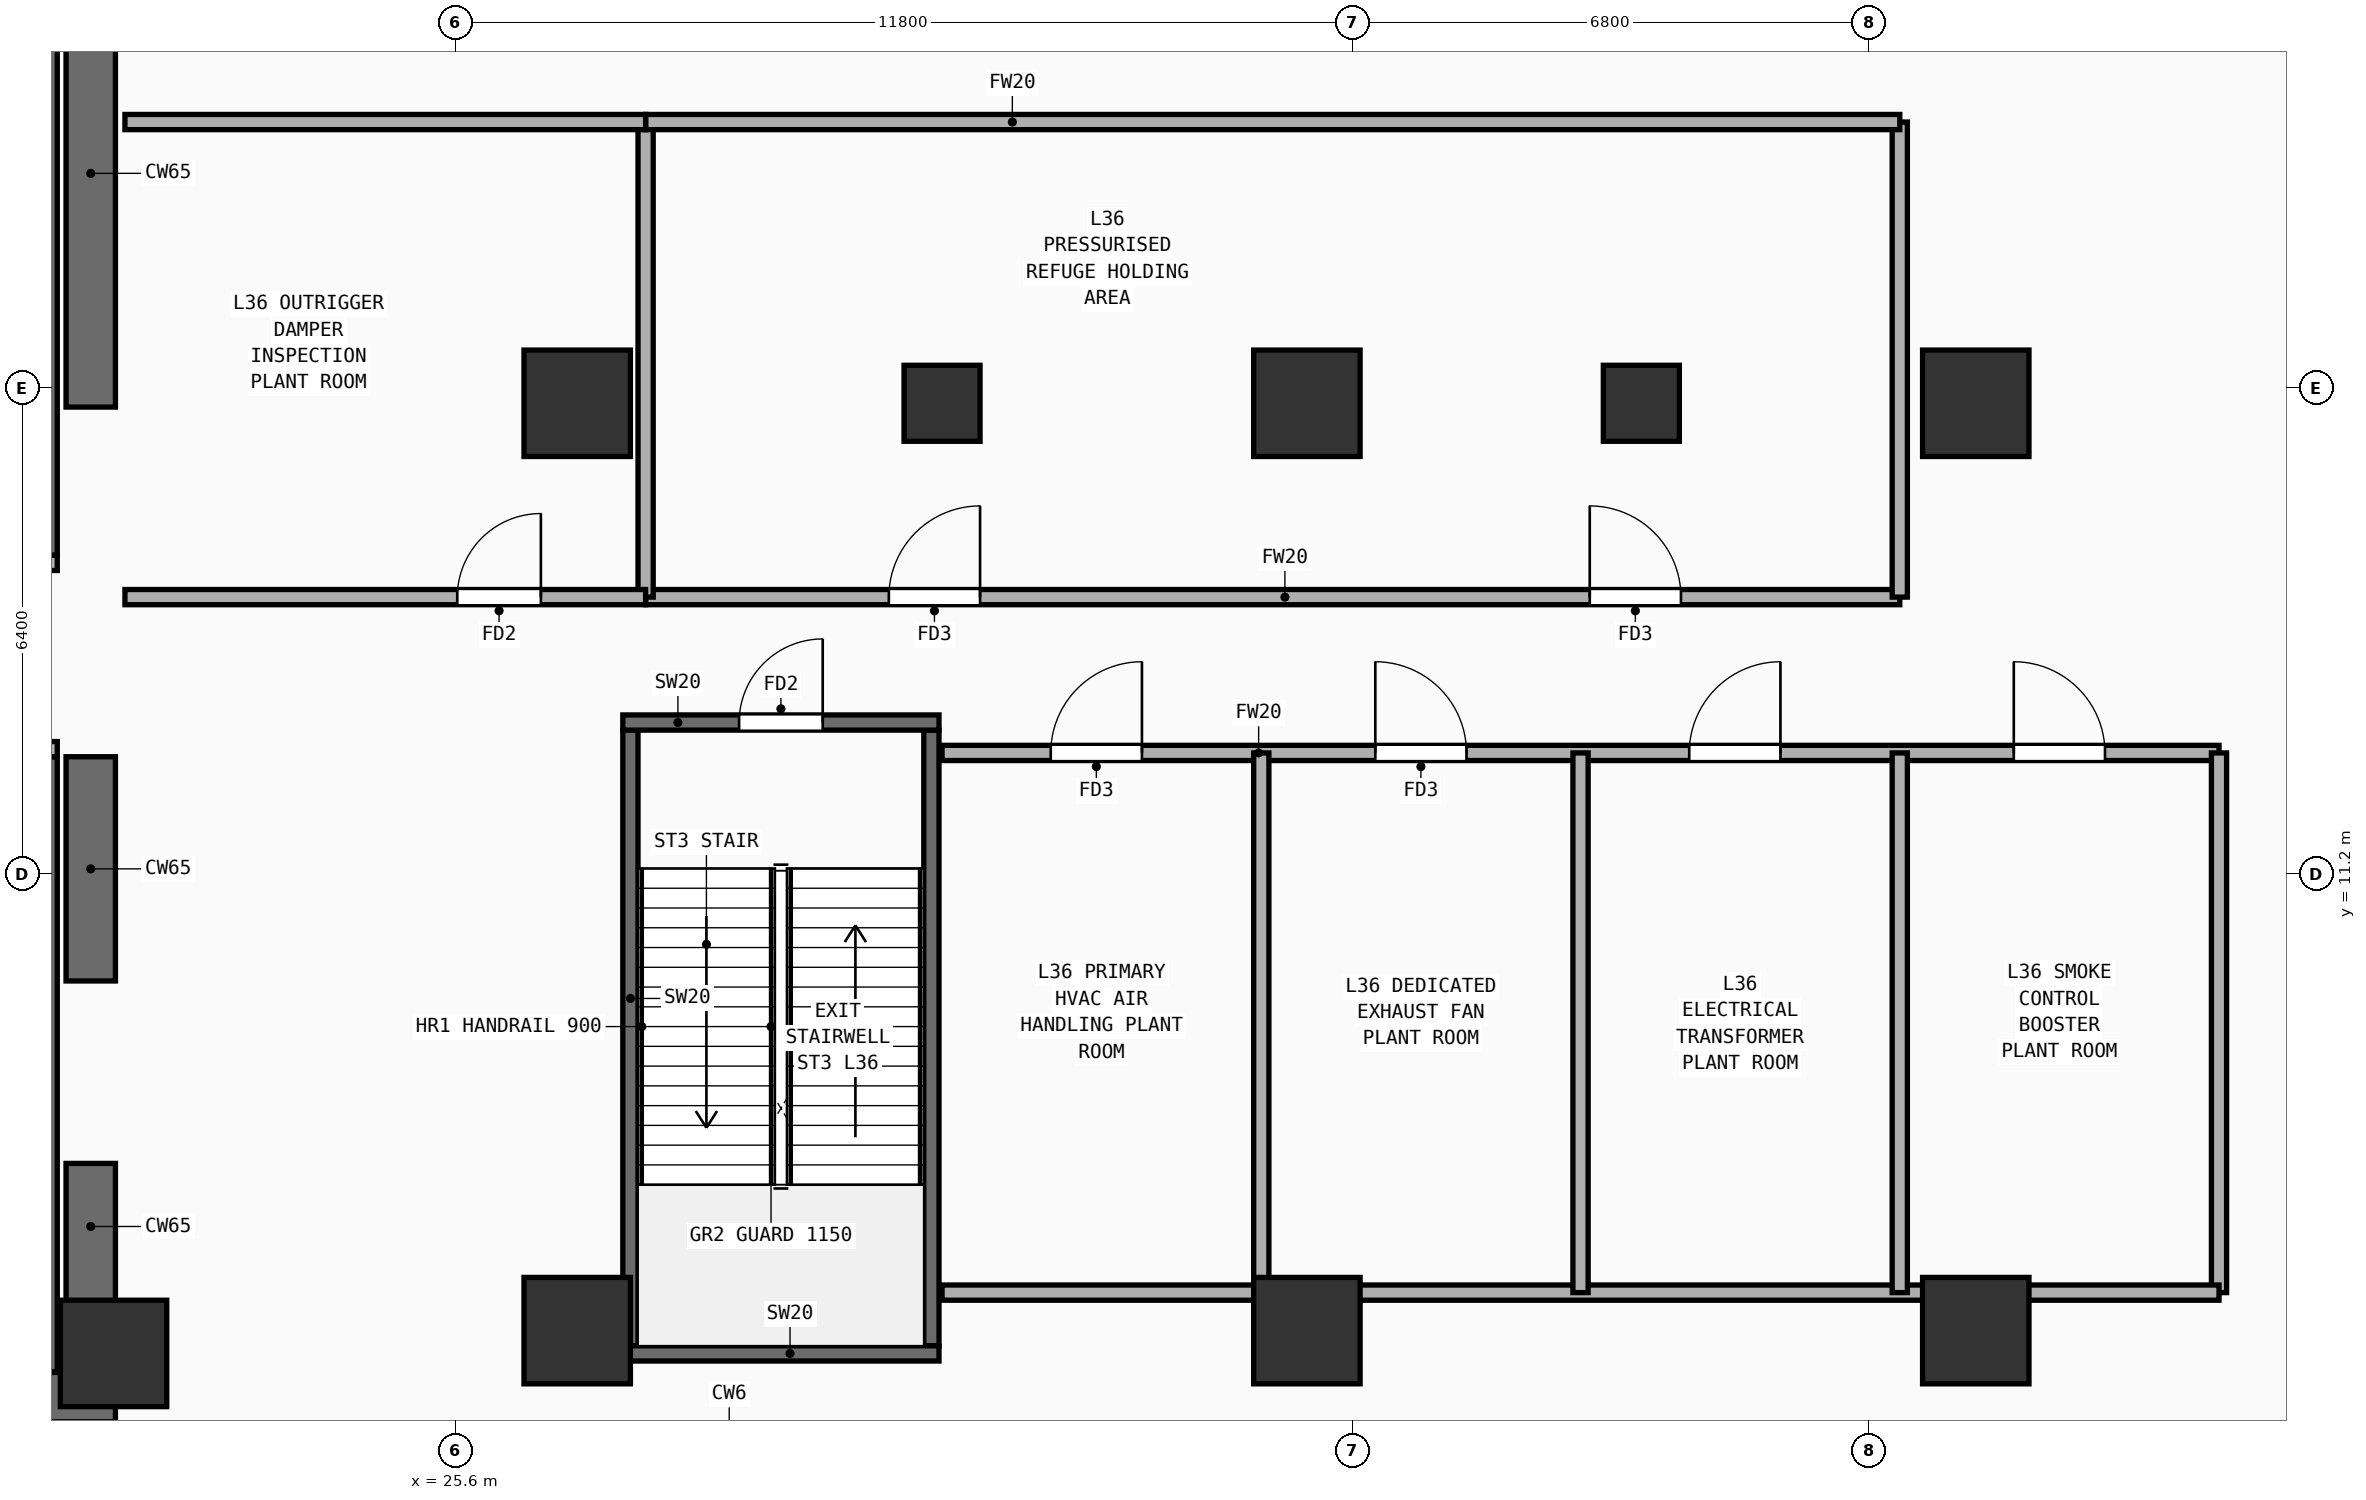
"""IFC4 building model, lengths in metres.
Left out: names, types, materials, properties, quantities, classifications, styles, units other than length and angle.
Written with IfcOpenShell. Run it as: python <this file> out.ifc"""

import sys

from ifc_helpers import new_model, si_unit, direction, frame, frame_2d, origin, origin_2d, place, context, subcontext, project, spatial, rectangle, extrude, element, fill, save


model = new_model("IFC4")
c1 = context("Model", 3, precision=1e-05, world=origin(), true_north=direction((0.0, 1.0)))
c2 = subcontext(c1, "Body", "Model", "MODEL_VIEW")
j1 = project(units=[si_unit("LENGTHUNIT", "METRE"), si_unit("PLANEANGLEUNIT", "RADIAN")], contexts=[c1])
p1 = place(None, origin())
s1 = spatial("IfcSite", under=j1, at=p1, CompositionType="ELEMENT")
p2 = place(p1, origin())
s2 = spatial("IfcBuilding", under=s1, at=p2, CompositionType="ELEMENT")
p3 = place(p2, frame((0.0, 0.0, 141.1)))
s3 = spatial("IfcBuildingStorey", under=s2, at=p3, CompositionType="ELEMENT", Elevation=141.1)
p4 = place(p3, frame((7.125, 4.325, 0.0), z_axis=(0.0, 0.0, 1.0), x_axis=(1.0, 0.0, 0.0)))
e1 = element("IfcWall", 1, at=p4, inside=s3, PredefinedType="SHEAR", context=c2, shape_type="SweptSolid", body=[
    extrude(rectangle(XDim=14.0, YDim=0.65, at=frame_2d((7.0, 0.0))), origin(), (0.0, 0.0, 1.0), 4.86),
])
p5 = place(p3, frame((20.8, 4.65, 0.0), z_axis=(0.0, 0.0, 1.0), x_axis=(0.0, 1.0, 0.0)))
e2 = element("IfcWall", 2, at=p5, inside=s3, PredefinedType="SHEAR", context=c2, shape_type="SweptSolid", body=[
    extrude(rectangle(XDim=2.75, YDim=0.65, at=frame_2d((1.375, 0.0))), origin(), (0.0, 0.0, 1.0), 4.86),
])
p6 = place(p3, frame((20.8, 9.8, 0.0), z_axis=(0.0, 0.0, 1.0), x_axis=(0.0, 1.0, 0.0)))
e3 = element("IfcWall", 3, at=p6, inside=s3, PredefinedType="SHEAR", context=c2, shape_type="SweptSolid", body=[
    extrude(rectangle(XDim=2.95, YDim=0.65, at=frame_2d((1.475, 0.0))), origin(), (0.0, 0.0, 1.0), 4.86),
])
p7 = place(p3, frame((20.8, 17.35, 0.0), z_axis=(0.0, 0.0, 1.0), x_axis=(0.0, 1.0, 0.0)))
e4 = element("IfcWall", 4, at=p7, inside=s3, PredefinedType="SHEAR", context=c2, shape_type="SweptSolid", body=[
    extrude(rectangle(XDim=6.15, YDim=0.65, at=frame_2d((3.075, 0.0))), origin(), (0.0, 0.0, 1.0), 4.86),
])
for number, where, z_axis, x_axis in (
    (5, (21.1, 4.9, 0.0), (0.0, 0.0, 1.0), (1.0, 0.0, 0.0)),
    (6, (27.2, 5.2, 0.0), (0.0, 0.0, 1.0), (1.0, 0.0, 0.0)),
    (7, (36.8, 5.2, 0.0), (0.0, 0.0, 1.0), (1.0, 0.0, 0.0)),
    (8, (45.6, 5.2, 0.0), (0.0, 0.0, 1.0), (1.0, 0.0, 0.0)),
    (9, (27.2, 17.4, 0.0), (0.0, 0.0, 1.0), (1.0, 0.0, 0.0)),
    (10, (36.8, 17.4, 0.0), (0.0, 0.0, 1.0), (1.0, 0.0, 0.0)),
    (11, (45.6, 17.4, 0.0), (0.0, 0.0, 1.0), (1.0, 0.0, 0.0)),
):
    element("IfcColumn", number, at=place(p3, frame(where, z_axis=z_axis, x_axis=x_axis)), inside=s3, PredefinedType="COLUMN", context=c2, shape_type="SweptSolid", body=[
        extrude(rectangle(XDim=1.4, YDim=1.4, at=origin_2d()), origin(), (0.0, 0.0, 1.0), 4.86),
    ])
for number, where, z_axis, x_axis in (
    (12, (32.0, 17.4, 0.0), (0.0, 0.0, 1.0), (1.0, 0.0, 0.0)),
    (13, (41.2, 17.4, 0.0), (0.0, 0.0, 1.0), (1.0, 0.0, 0.0)),
):
    element("IfcColumn", number, at=place(p3, frame(where, z_axis=z_axis, x_axis=x_axis)), inside=s3, PredefinedType="COLUMN", context=c2, shape_type="SweptSolid", body=[
        extrude(rectangle(XDim=1.0, YDim=1.0, at=origin_2d()), origin(), (0.0, 0.0, 1.0), 4.86),
    ])
p8 = place(p3, frame((20.26, 4.66, 0.0), z_axis=(0.0, 0.0, 1.0), x_axis=(0.0, 1.0, 0.0)))
e14 = element("IfcWall", 14, at=p8, inside=s3, PredefinedType="SHEAR", context=c2, shape_type="SweptSolid", body=[
    extrude(rectangle(XDim=8.09, YDim=0.2, at=frame_2d((4.045, 0.0))), origin(), (0.0, 0.0, 1.0), 4.86),
])
p9 = place(p3, frame((16.4, 12.85, 0.0), z_axis=(0.0, 0.0, 1.0), x_axis=(1.0, 0.0, 0.0)))
e15 = element("IfcWall", 15, at=p9, inside=s3, PredefinedType="PARTITIONING", context=c2, shape_type="SweptSolid", body=[
    extrude(rectangle(XDim=3.96, YDim=0.2, at=frame_2d((1.98, 0.0))), origin(), (0.0, 0.0, 1.0), 4.86),
])
p10 = place(p9, frame((1.304, 0.0, 0.0)))
e16 = element("IfcOpeningElement", 16, at=p10, cuts=e15, PredefinedType="OPENING", context=c2, shape_type="SweptSolid", body=[
    extrude(rectangle(XDim=1.1, YDim=2.2, at=frame_2d((0.55, 1.1))), frame((0.0, 0.11, 0.0), z_axis=(0.0, -1.0, 0.0), x_axis=(1.0, 0.0, 0.0)), (0.0, 0.0, 1.0), 0.22),
])
p11 = place(p3, frame((20.26, 15.4, 0.0), z_axis=(0.0, 0.0, 1.0), x_axis=(0.0, 1.0, 0.0)))
e17 = element("IfcWall", 17, at=p11, inside=s3, PredefinedType="SHEAR", context=c2, shape_type="SweptSolid", body=[
    extrude(rectangle(XDim=8.09, YDim=0.2, at=frame_2d((4.045, 0.0))), origin(), (0.0, 0.0, 1.0), 4.86),
])
p12 = place(p3, frame((16.41, 15.3, 0.0), z_axis=(0.0, 0.0, 1.0), x_axis=(1.0, 0.0, 0.0)))
e18 = element("IfcWall", 18, at=p12, inside=s3, PredefinedType="PARTITIONING", context=c2, shape_type="SweptSolid", body=[
    extrude(rectangle(XDim=3.95, YDim=0.2, at=frame_2d((1.975, 0.0))), origin(), (0.0, 0.0, 1.0), 4.86),
])
p13 = place(p12, frame((1.294, 0.0, 0.0)))
e19 = element("IfcOpeningElement", 19, at=p13, cuts=e18, PredefinedType="OPENING", context=c2, shape_type="SweptSolid", body=[
    extrude(rectangle(XDim=1.1, YDim=2.2, at=frame_2d((0.55, 1.1))), frame((0.0, 0.11, 0.0), z_axis=(0.0, -1.0, 0.0), x_axis=(1.0, 0.0, 0.0)), (0.0, 0.0, 1.0), 0.22),
])
for number, where, z_axis, x_axis in (
    (20, (27.9, 5.0, 0.0), (0.0, 0.0, 1.0), (0.0, 1.0, 0.0)),
    (21, (31.86, 5.0, 0.0), (0.0, 0.0, 1.0), (0.0, 1.0, 0.0)),
):
    element("IfcWall", number, at=place(p3, frame(where, z_axis=z_axis, x_axis=x_axis)), inside=s3, PredefinedType="SHEAR", context=c2, shape_type="SweptSolid", body=[
        extrude(rectangle(XDim=8.1, YDim=0.2, at=frame_2d((4.05, 0.0))), origin(), (0.0, 0.0, 1.0), 4.86),
    ])
p14 = place(p3, frame((27.8, 4.9, 0.0), z_axis=(0.0, 0.0, 1.0), x_axis=(1.0, 0.0, 0.0)))
e22 = element("IfcWall", 22, at=p14, inside=s3, PredefinedType="SHEAR", context=c2, shape_type="SweptSolid", body=[
    extrude(rectangle(XDim=4.16, YDim=0.2, at=frame_2d((2.08, 0.0))), origin(), (0.0, 0.0, 1.0), 4.86),
])
p15 = place(p3, frame((27.8, 13.2, 0.0), z_axis=(0.0, 0.0, 1.0), x_axis=(1.0, 0.0, 0.0)))
e23 = element("IfcWall", 23, at=p15, inside=s3, PredefinedType="SHEAR", context=c2, shape_type="SweptSolid", body=[
    extrude(rectangle(XDim=4.16, YDim=0.2, at=frame_2d((2.08, 0.0))), origin(), (0.0, 0.0, 1.0), 4.86),
])
p16 = place(p15, frame((1.53, 0.0, 0.0)))
e24 = element("IfcOpeningElement", 24, at=p16, cuts=e23, PredefinedType="OPENING", context=c2, shape_type="SweptSolid", body=[
    extrude(rectangle(XDim=1.1, YDim=2.2, at=frame_2d((0.55, 1.1))), frame((0.0, 0.11, 0.0), z_axis=(0.0, -1.0, 0.0), x_axis=(1.0, 0.0, 0.0)), (0.0, 0.0, 1.0), 0.22),
])
p17 = place(p3, frame((28.1, 14.85, 0.0), z_axis=(0.0, 0.0, 1.0), x_axis=(1.0, 0.0, 0.0)))
e25 = element("IfcWall", 25, at=p17, inside=s3, PredefinedType="PARTITIONING", context=c2, shape_type="SweptSolid", body=[
    extrude(rectangle(XDim=16.5, YDim=0.2, at=frame_2d((8.25, 0.0))), origin(), (0.0, 0.0, 1.0), 4.86),
])
p18 = place(p17, frame((3.2, 0.0, 0.0)))
e26 = element("IfcOpeningElement", 26, at=p18, cuts=e25, PredefinedType="OPENING", context=c2, shape_type="SweptSolid", body=[
    extrude(rectangle(XDim=1.2, YDim=2.25, at=frame_2d((0.6, 1.125))), frame((0.0, 0.11, 0.0), z_axis=(0.0, -1.0, 0.0), x_axis=(1.0, 0.0, 0.0)), (0.0, 0.0, 1.0), 0.22),
])
p19 = place(p17, frame((12.421, 0.0, 0.0)))
e27 = element("IfcOpeningElement", 27, at=p19, cuts=e25, PredefinedType="OPENING", context=c2, shape_type="SweptSolid", body=[
    extrude(rectangle(XDim=1.2, YDim=2.25, at=frame_2d((0.6, 1.125))), frame((0.0, 0.11, 0.0), z_axis=(0.0, -1.0, 0.0), x_axis=(1.0, 0.0, 0.0)), (0.0, 0.0, 1.0), 0.22),
])
for number, where, z_axis, x_axis in (
    (28, (28.1, 14.85, 0.0), (0.0, 0.0, 1.0), (0.0, 1.0, 0.0)),
    (29, (44.6, 14.85, 0.0), (0.0, 0.0, 1.0), (0.0, 1.0, 0.0)),
):
    element("IfcWall", number, at=place(p3, frame(where, z_axis=z_axis, x_axis=x_axis)), inside=s3, PredefinedType="PARTITIONING", context=c2, shape_type="SweptSolid", body=[
        extrude(rectangle(XDim=6.25, YDim=0.2, at=frame_2d((3.125, 0.0))), origin(), (0.0, 0.0, 1.0), 4.86),
    ])
p20 = place(p3, frame((28.1, 21.1, 0.0), z_axis=(0.0, 0.0, 1.0), x_axis=(1.0, 0.0, 0.0)))
e30 = element("IfcWall", 30, at=p20, inside=s3, PredefinedType="PARTITIONING", context=c2, shape_type="SweptSolid", body=[
    extrude(rectangle(XDim=16.5, YDim=0.2, at=frame_2d((8.25, 0.0))), origin(), (0.0, 0.0, 1.0), 4.86),
])
p21 = place(p3, frame((21.25, 14.85, 0.0), z_axis=(0.0, 0.0, 1.0), x_axis=(1.0, 0.0, 0.0)))
e31 = element("IfcWall", 31, at=p21, inside=s3, PredefinedType="PARTITIONING", context=c2, shape_type="SweptSolid", body=[
    extrude(rectangle(XDim=6.85, YDim=0.2, at=frame_2d((3.425, 0.0))), origin(), (0.0, 0.0, 1.0), 4.86),
])
p22 = place(p21, frame((4.372, 0.0, 0.0)))
e32 = element("IfcOpeningElement", 32, at=p22, cuts=e31, PredefinedType="OPENING", context=c2, shape_type="SweptSolid", body=[
    extrude(rectangle(XDim=1.1, YDim=2.2, at=frame_2d((0.55, 1.1))), frame((0.0, 0.11, 0.0), z_axis=(0.0, -1.0, 0.0), x_axis=(1.0, 0.0, 0.0)), (0.0, 0.0, 1.0), 0.22),
])
p23 = place(p3, frame((21.25, 21.1, 0.0), z_axis=(0.0, 0.0, 1.0), x_axis=(1.0, 0.0, 0.0)))
e33 = element("IfcWall", 33, at=p23, inside=s3, PredefinedType="PARTITIONING", context=c2, shape_type="SweptSolid", body=[
    extrude(rectangle(XDim=6.85, YDim=0.2, at=frame_2d((3.425, 0.0))), origin(), (0.0, 0.0, 1.0), 4.86),
])
p24 = place(p3, frame((32.0, 12.8, 0.0), z_axis=(0.0, 0.0, 1.0), x_axis=(1.0, 0.0, 0.0)))
e34 = element("IfcWall", 34, at=p24, inside=s3, PredefinedType="PARTITIONING", context=c2, shape_type="SweptSolid", body=[
    extrude(rectangle(XDim=16.8, YDim=0.2, at=frame_2d((8.4, 0.0))), origin(), (0.0, 0.0, 1.0), 4.86),
])
p25 = place(p24, frame((1.43, 0.0, 0.0)))
e35 = element("IfcOpeningElement", 35, at=p25, cuts=e34, PredefinedType="OPENING", context=c2, shape_type="SweptSolid", body=[
    extrude(rectangle(XDim=1.2, YDim=2.25, at=frame_2d((0.6, 1.125))), frame((0.0, 0.11, 0.0), z_axis=(0.0, -1.0, 0.0), x_axis=(1.0, 0.0, 0.0)), (0.0, 0.0, 1.0), 0.22),
])
p26 = place(p24, frame((5.7, 0.0, 0.0)))
e36 = element("IfcOpeningElement", 36, at=p26, cuts=e34, PredefinedType="OPENING", context=c2, shape_type="SweptSolid", body=[
    extrude(rectangle(XDim=1.2, YDim=2.25, at=frame_2d((0.6, 1.125))), frame((0.0, 0.11, 0.0), z_axis=(0.0, -1.0, 0.0), x_axis=(1.0, 0.0, 0.0)), (0.0, 0.0, 1.0), 0.22),
])
p27 = place(p24, frame((9.83, 0.0, 0.0)))
e37 = element("IfcOpeningElement", 37, at=p27, cuts=e34, PredefinedType="OPENING", context=c2, shape_type="SweptSolid", body=[
    extrude(rectangle(XDim=1.2, YDim=2.25, at=frame_2d((0.6, 1.125))), frame((0.0, 0.11, 0.0), z_axis=(0.0, -1.0, 0.0), x_axis=(1.0, 0.0, 0.0)), (0.0, 0.0, 1.0), 0.22),
])
p28 = place(p24, frame((14.1, 0.0, 0.0)))
e38 = element("IfcOpeningElement", 38, at=p28, cuts=e34, PredefinedType="OPENING", context=c2, shape_type="SweptSolid", body=[
    extrude(rectangle(XDim=1.2, YDim=2.25, at=frame_2d((0.6, 1.125))), frame((0.0, 0.11, 0.0), z_axis=(0.0, -1.0, 0.0), x_axis=(1.0, 0.0, 0.0)), (0.0, 0.0, 1.0), 0.22),
])
p29 = place(p3, frame((48.8, 5.7, 0.0), z_axis=(0.0, 0.0, 1.0), x_axis=(0.0, 1.0, 0.0)))
e39 = element("IfcWall", 39, at=p29, inside=s3, PredefinedType="PARTITIONING", context=c2, shape_type="SweptSolid", body=[
    extrude(rectangle(XDim=7.1, YDim=0.2, at=frame_2d((3.55, 0.0))), origin(), (0.0, 0.0, 1.0), 4.86),
])
p30 = place(p3, frame((32.0, 5.7, 0.0), z_axis=(0.0, 0.0, 1.0), x_axis=(1.0, 0.0, 0.0)))
e40 = element("IfcWall", 40, at=p30, inside=s3, PredefinedType="PARTITIONING", context=c2, shape_type="SweptSolid", body=[
    extrude(rectangle(XDim=16.8, YDim=0.2, at=frame_2d((8.4, 0.0))), origin(), (0.0, 0.0, 1.0), 4.86),
])
for number, where, z_axis, x_axis in (
    (41, (36.2, 5.7, 0.0), (0.0, 0.0, 1.0), (0.0, 1.0, 0.0)),
    (42, (40.4, 5.7, 0.0), (0.0, 0.0, 1.0), (0.0, 1.0, 0.0)),
    (43, (44.6, 5.7, 0.0), (0.0, 0.0, 1.0), (0.0, 1.0, 0.0)),
):
    element("IfcWall", number, at=place(p3, frame(where, z_axis=z_axis, x_axis=x_axis)), inside=s3, PredefinedType="PARTITIONING", context=c2, shape_type="SweptSolid", body=[
        extrude(rectangle(XDim=7.1, YDim=0.2, at=frame_2d((3.55, 0.0))), origin(), (0.0, 0.0, 1.0), 4.86),
    ])
p31 = place(p16, frame((1.1, 0.0, 0.0), z_axis=(0.0, 0.0, 1.0), x_axis=(-1.0, 0.0, 0.0)))
e44 = element("IfcDoor", 44, at=p31, inside=s3, OperationType="SINGLE_SWING_LEFT", PredefinedType="DOOR", context=c2, shape_type="SweptSolid", body=[
    extrude(rectangle(XDim=1.1, YDim=2.2, at=frame_2d((0.55, 1.1))), frame((0.0, 0.025, 0.0), z_axis=(0.0, -1.0, 0.0), x_axis=(1.0, 0.0, 0.0)), (0.0, 0.0, 1.0), 0.05),
])
fill(e24, e44)
p32 = place(p18, origin())
e45 = element("IfcDoor", 45, at=p32, inside=s3, OperationType="SINGLE_SWING_RIGHT", PredefinedType="DOOR", context=c2, shape_type="SweptSolid", body=[
    extrude(rectangle(XDim=1.2, YDim=2.25, at=frame_2d((0.6, 1.125))), frame((0.0, 0.025, 0.0), z_axis=(0.0, -1.0, 0.0), x_axis=(1.0, 0.0, 0.0)), (0.0, 0.0, 1.0), 0.05),
])
fill(e26, e45)
p33 = place(p19, origin())
e46 = element("IfcDoor", 46, at=p33, inside=s3, OperationType="SINGLE_SWING_LEFT", PredefinedType="DOOR", context=c2, shape_type="SweptSolid", body=[
    extrude(rectangle(XDim=1.2, YDim=2.25, at=frame_2d((0.6, 1.125))), frame((0.0, 0.025, 0.0), z_axis=(0.0, -1.0, 0.0), x_axis=(1.0, 0.0, 0.0)), (0.0, 0.0, 1.0), 0.05),
])
fill(e27, e46)
p34 = place(p22, origin())
e47 = element("IfcDoor", 47, at=p34, inside=s3, OperationType="SINGLE_SWING_RIGHT", PredefinedType="DOOR", context=c2, shape_type="SweptSolid", body=[
    extrude(rectangle(XDim=1.1, YDim=2.2, at=frame_2d((0.55, 1.1))), frame((0.0, 0.025, 0.0), z_axis=(0.0, -1.0, 0.0), x_axis=(1.0, 0.0, 0.0)), (0.0, 0.0, 1.0), 0.05),
])
fill(e32, e47)
p35 = place(p25, origin())
e48 = element("IfcDoor", 48, at=p35, inside=s3, OperationType="SINGLE_SWING_RIGHT", PredefinedType="DOOR", context=c2, shape_type="SweptSolid", body=[
    extrude(rectangle(XDim=1.2, YDim=2.25, at=frame_2d((0.6, 1.125))), frame((0.0, 0.025, 0.0), z_axis=(0.0, -1.0, 0.0), x_axis=(1.0, 0.0, 0.0)), (0.0, 0.0, 1.0), 0.05),
])
fill(e35, e48)
p36 = place(p26, origin())
e49 = element("IfcDoor", 49, at=p36, inside=s3, OperationType="SINGLE_SWING_LEFT", PredefinedType="DOOR", context=c2, shape_type="SweptSolid", body=[
    extrude(rectangle(XDim=1.2, YDim=2.25, at=frame_2d((0.6, 1.125))), frame((0.0, 0.025, 0.0), z_axis=(0.0, -1.0, 0.0), x_axis=(1.0, 0.0, 0.0)), (0.0, 0.0, 1.0), 0.05),
])
fill(e36, e49)
p37 = place(p27, origin())
e50 = element("IfcDoor", 50, at=p37, inside=s3, OperationType="SINGLE_SWING_RIGHT", PredefinedType="DOOR", context=c2, shape_type="SweptSolid", body=[
    extrude(rectangle(XDim=1.2, YDim=2.25, at=frame_2d((0.6, 1.125))), frame((0.0, 0.025, 0.0), z_axis=(0.0, -1.0, 0.0), x_axis=(1.0, 0.0, 0.0)), (0.0, 0.0, 1.0), 0.05),
])
fill(e37, e50)
p38 = place(p28, origin())
e51 = element("IfcDoor", 51, at=p38, inside=s3, OperationType="SINGLE_SWING_LEFT", PredefinedType="DOOR", context=c2, shape_type="SweptSolid", body=[
    extrude(rectangle(XDim=1.2, YDim=2.25, at=frame_2d((0.6, 1.125))), frame((0.0, 0.025, 0.0), z_axis=(0.0, -1.0, 0.0), x_axis=(1.0, 0.0, 0.0)), (0.0, 0.0, 1.0), 0.05),
])
fill(e38, e51)
save(model, sys.argv[1])
